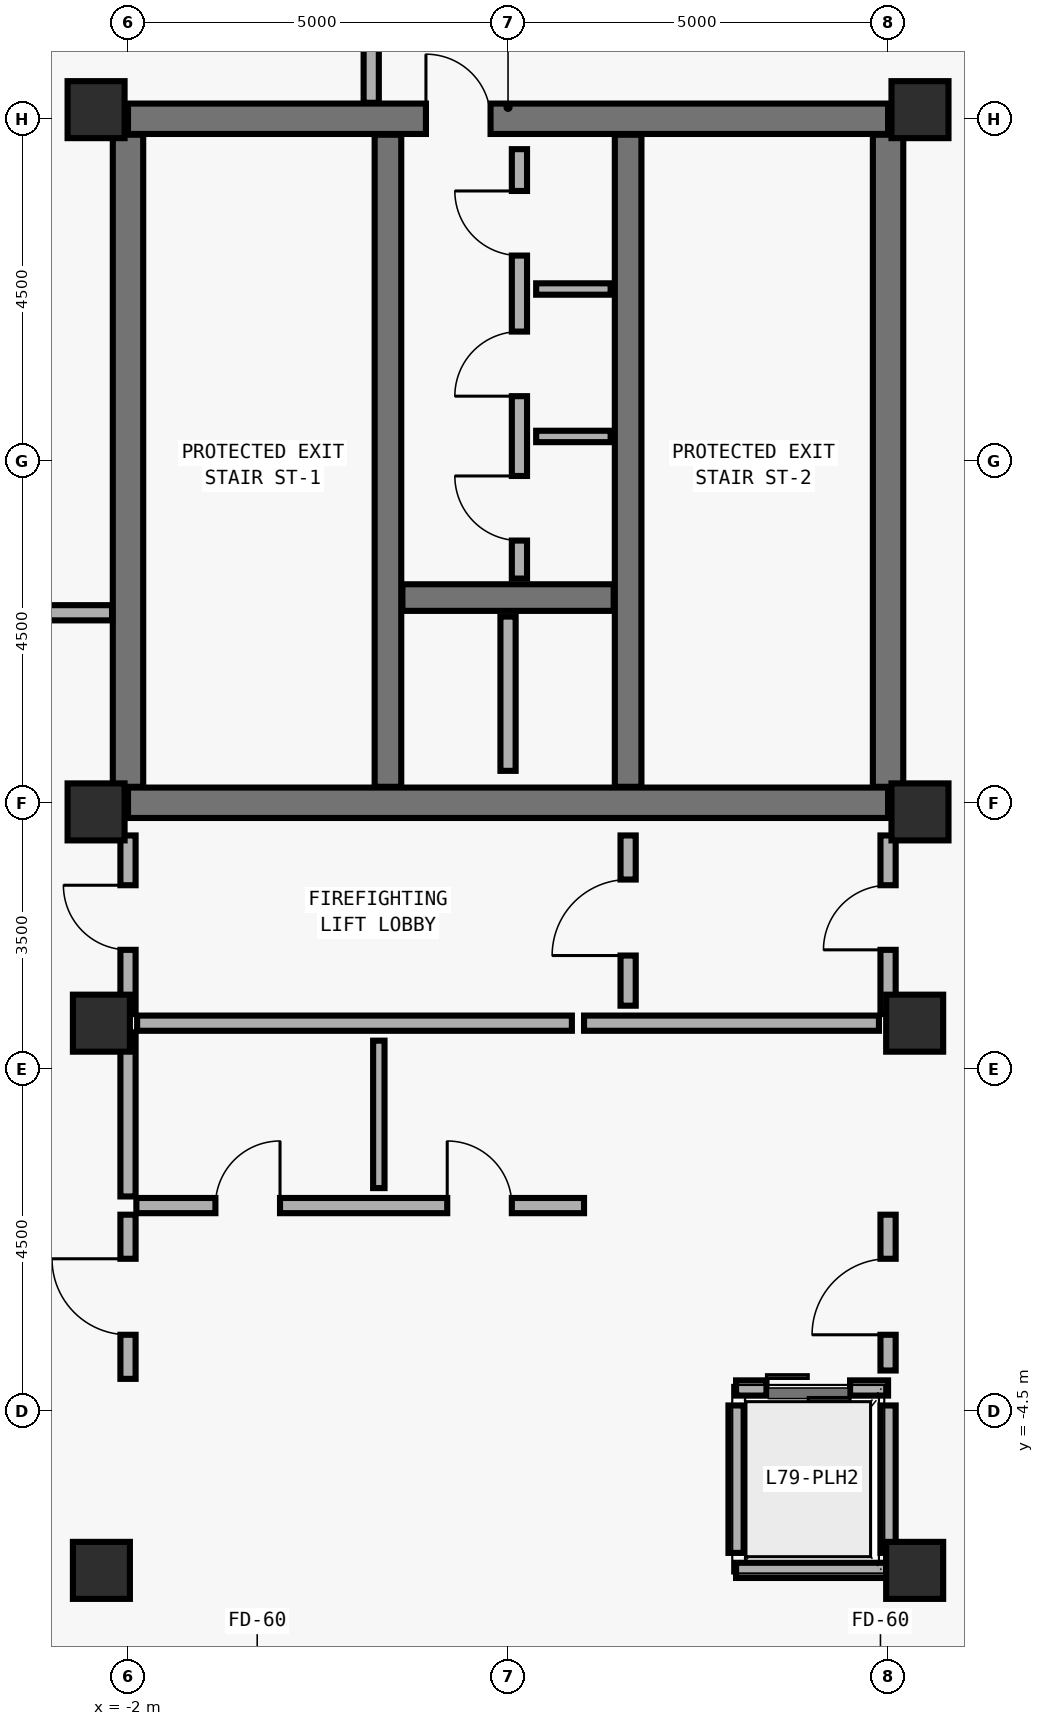
"""IFC4 building model, lengths in metres.
Left out: names, types, materials, properties, quantities, classifications, styles, units other than length and angle.
Written with IfcOpenShell. Run it as: python <this file> out.ifc"""

import sys

from ifc_helpers import new_model, si_unit, direction, frame, frame_2d, origin, origin_2d, place, context, subcontext, project, spatial, rectangle, extrude, element, fill, save


model = new_model("IFC4")
c1 = context("Model", 3, precision=1e-05, world=origin(), true_north=direction((0.0, 1.0)))
c2 = subcontext(c1, "Body", "Model", "MODEL_VIEW")
j1 = project(units=[si_unit("LENGTHUNIT", "METRE"), si_unit("PLANEANGLEUNIT", "RADIAN")], contexts=[c1])
p1 = place(None, origin())
s1 = spatial("IfcSite", under=j1, at=p1, CompositionType="ELEMENT")
p2 = place(p1, origin())
s2 = spatial("IfcBuilding", under=s1, at=p2, CompositionType="ELEMENT")
p3 = place(p2, frame((0.0, 0.0, 310.8)))
s3 = spatial("IfcBuildingStorey", under=s2, at=p3, CompositionType="ELEMENT", Elevation=310.8)
p4 = place(p3, frame((-2.0, 3.5, 0.0), z_axis=(0.0, 0.0, 1.0), x_axis=(1.0, 0.0, 0.0)))
e1 = element("IfcWall", 1, at=p4, inside=s3, PredefinedType="SHEAR", context=c2, shape_type="SweptSolid", body=[
    extrude(rectangle(XDim=10.0, YDim=0.4, at=frame_2d((5.0, 0.0))), origin(), (0.0, 0.0, 1.0), 4.192),
])
p5 = place(p3, frame((-2.0, 12.5, 0.0), z_axis=(0.0, 0.0, 1.0), x_axis=(1.0, 0.0, 0.0)))
e2 = element("IfcWall", 2, at=p5, inside=s3, PredefinedType="SHEAR", context=c2, shape_type="SweptSolid", body=[
    extrude(rectangle(XDim=10.0, YDim=0.4, at=frame_2d((5.0, 0.0))), origin(), (0.0, 0.0, 1.0), 4.192),
])
p6 = place(p5, frame((3.92, 0.0, 0.0)))
e3 = element("IfcOpeningElement", 3, at=p6, cuts=e2, PredefinedType="OPENING", context=c2, shape_type="SweptSolid", body=[
    extrude(rectangle(XDim=0.85, YDim=2.1, at=frame_2d((0.425, 1.05))), frame((0.0, 0.21, 0.0), z_axis=(0.0, -1.0, 0.0), x_axis=(1.0, 0.0, 0.0)), (0.0, 0.0, 1.0), 0.42),
])
for number, where, z_axis, x_axis in (
    (4, (-2.0, 3.71, 0.0), (0.0, 0.0, 1.0), (0.0, 1.0, 0.0)),
    (5, (8.0, 3.71, 0.0), (0.0, 0.0, 1.0), (0.0, 1.0, 0.0)),
):
    element("IfcWall", number, at=place(p3, frame(where, z_axis=z_axis, x_axis=x_axis)), inside=s3, PredefinedType="SHEAR", context=c2, shape_type="SweptSolid", body=[
        extrude(rectangle(XDim=8.58, YDim=0.4, at=frame_2d((4.29, 0.0))), origin(), (0.0, 0.0, 1.0), 4.192),
    ])
for number, where, z_axis, x_axis in (
    (6, (1.42, 3.71, 0.0), (0.0, 0.0, 1.0), (0.0, 1.0, 0.0)),
    (7, (4.58, 3.71, 0.0), (0.0, 0.0, 1.0), (0.0, 1.0, 0.0)),
):
    element("IfcWall", number, at=place(p3, frame(where, z_axis=z_axis, x_axis=x_axis)), inside=s3, PredefinedType="SHEAR", context=c2, shape_type="SweptSolid", body=[
        extrude(rectangle(XDim=8.58, YDim=0.35, at=frame_2d((4.29, 0.0))), origin(), (0.0, 0.0, 1.0), 4.192),
    ])
p7 = place(p3, frame((1.61, 6.2, 0.0), z_axis=(0.0, 0.0, 1.0), x_axis=(1.0, 0.0, 0.0)))
e8 = element("IfcWall", 8, at=p7, inside=s3, PredefinedType="SHEAR", context=c2, shape_type="SweptSolid", body=[
    extrude(rectangle(XDim=2.78, YDim=0.35, at=frame_2d((1.39, 0.0))), origin(), (0.0, 0.0, 1.0), 4.192),
])
for number, where, z_axis, x_axis in (
    (9, (-2.42, 12.62, 0.0), (0.0, 0.0, 1.0), (1.0, 0.0, 0.0)),
    (10, (8.42, 12.62, 0.0), (0.0, 0.0, 1.0), (1.0, 0.0, 0.0)),
    (11, (-2.42, 3.38, 0.0), (0.0, 0.0, 1.0), (1.0, 0.0, 0.0)),
    (12, (8.42, 3.38, 0.0), (0.0, 0.0, 1.0), (1.0, 0.0, 0.0)),
    (13, (-2.35, 0.6, 0.0), (0.0, 0.0, 1.0), (1.0, 0.0, 0.0)),
    (14, (8.35, 0.6, 0.0), (0.0, 0.0, 1.0), (1.0, 0.0, 0.0)),
    (15, (-2.35, -6.6, 0.0), (0.0, 0.0, 1.0), (1.0, 0.0, 0.0)),
    (16, (8.35, -6.6, 0.0), (0.0, 0.0, 1.0), (1.0, 0.0, 0.0)),
):
    element("IfcColumn", number, at=place(p3, frame(where, z_axis=z_axis, x_axis=x_axis)), inside=s3, PredefinedType="COLUMN", context=c2, shape_type="SweptSolid", body=[
        extrude(rectangle(XDim=0.75, YDim=0.75, at=origin_2d()), origin(), (0.0, 0.0, 1.0), 4.175),
    ])
p8 = place(p3, frame((3.0, 3.92, 0.0), z_axis=(0.0, 0.0, 1.0), x_axis=(0.0, 1.0, 0.0)))
e17 = element("IfcWall", 17, at=p8, inside=s3, PredefinedType="SOLIDWALL", context=c2, shape_type="SweptSolid", body=[
    extrude(rectangle(XDim=2.03, YDim=0.2, at=frame_2d((1.015, 0.0))), origin(), (0.0, 0.0, 1.0), 3.96),
])
p9 = place(p3, frame((4.0, 0.6, 0.0), z_axis=(0.0, 0.0, 1.0), x_axis=(1.0, 0.0, 0.0)))
e18 = element("IfcWall", 18, at=p9, inside=s3, PredefinedType="SOLIDWALL", context=c2, shape_type="SweptSolid", body=[
    extrude(rectangle(XDim=3.88, YDim=0.2, at=frame_2d((1.94, 0.0))), origin(), (0.0, 0.0, 1.0), 3.672),
])
p10 = place(p3, frame((6.0, -4.2, 0.0), z_axis=(0.0, 0.0, 1.0), x_axis=(1.0, 0.0, 0.0)))
e19 = element("IfcWall", 19, at=p10, inside=s3, PredefinedType="SOLIDWALL", context=c2, shape_type="SweptSolid", body=[
    extrude(rectangle(XDim=2.0, YDim=0.2, at=frame_2d((1.0, 0.0))), origin(), (0.0, 0.0, 1.0), 3.96),
])
p11 = place(p10, frame((0.4, 0.0, 0.0)))
e20 = element("IfcOpeningElement", 20, at=p11, cuts=e19, PredefinedType="OPENING", context=c2, shape_type="SweptSolid", body=[
    extrude(rectangle(XDim=1.1, YDim=2.2, at=frame_2d((0.55, 1.1))), frame((0.0, 0.11, 0.0), z_axis=(0.0, -1.0, 0.0), x_axis=(1.0, 0.0, 0.0)), (0.0, 0.0, 1.0), 0.22),
])
p12 = place(p3, frame((6.0, -6.6, 0.0), z_axis=(0.0, 0.0, 1.0), x_axis=(1.0, 0.0, 0.0)))
e21 = element("IfcWall", 21, at=p12, inside=s3, PredefinedType="SOLIDWALL", context=c2, shape_type="SweptSolid", body=[
    extrude(rectangle(XDim=2.0, YDim=0.2, at=frame_2d((1.0, 0.0))), origin(), (0.0, 0.0, 1.0), 3.672),
])
p13 = place(p3, frame((6.0, -6.37, 0.0), z_axis=(0.0, 0.0, 1.0), x_axis=(0.0, 1.0, 0.0)))
e22 = element("IfcWall", 22, at=p13, inside=s3, PredefinedType="SOLIDWALL", context=c2, shape_type="SweptSolid", body=[
    extrude(rectangle(XDim=1.94, YDim=0.2, at=frame_2d((0.97, 0.0))), origin(), (0.0, 0.0, 1.0), 3.96),
])
p14 = place(p3, frame((8.0, -6.37, 0.0), z_axis=(0.0, 0.0, 1.0), x_axis=(0.0, 1.0, 0.0)))
e23 = element("IfcWall", 23, at=p14, inside=s3, PredefinedType="SOLIDWALL", context=c2, shape_type="SweptSolid", body=[
    extrude(rectangle(XDim=1.94, YDim=0.2, at=frame_2d((0.97, 0.0))), origin(), (0.0, 0.0, 1.0), 3.672),
])
p15 = place(p3, frame((3.15, 6.45, 0.0), z_axis=(0.0, 0.0, 1.0), x_axis=(0.0, 1.0, 0.0)))
e24 = element("IfcWall", 24, at=p15, inside=s3, PredefinedType="MOVABLE", context=c2, shape_type="SweptSolid", body=[
    extrude(rectangle(XDim=5.65, YDim=0.2, at=frame_2d((2.825, 0.0))), origin(), (0.0, 0.0, 1.0), 3.96),
])
p16 = place(p15, frame((0.5, 0.0, 0.0)))
e25 = element("IfcOpeningElement", 25, at=p16, cuts=e24, PredefinedType="OPENING", context=c2, shape_type="SweptSolid", body=[
    extrude(rectangle(XDim=0.85, YDim=2.1, at=frame_2d((0.425, 1.05))), frame((0.0, 0.11, 0.0), z_axis=(0.0, -1.0, 0.0), x_axis=(1.0, 0.0, 0.0)), (0.0, 0.0, 1.0), 0.22),
])
p17 = place(p15, frame((2.4, 0.0, 0.0)))
e26 = element("IfcOpeningElement", 26, at=p17, cuts=e24, PredefinedType="OPENING", context=c2, shape_type="SweptSolid", body=[
    extrude(rectangle(XDim=0.85, YDim=2.1, at=frame_2d((0.425, 1.05))), frame((0.0, 0.11, 0.0), z_axis=(0.0, -1.0, 0.0), x_axis=(1.0, 0.0, 0.0)), (0.0, 0.0, 1.0), 0.22),
])
p18 = place(p15, frame((4.25, 0.0, 0.0)))
e27 = element("IfcOpeningElement", 27, at=p18, cuts=e24, PredefinedType="OPENING", context=c2, shape_type="SweptSolid", body=[
    extrude(rectangle(XDim=0.85, YDim=2.1, at=frame_2d((0.425, 1.05))), frame((0.0, 0.11, 0.0), z_axis=(0.0, -1.0, 0.0), x_axis=(1.0, 0.0, 0.0)), (0.0, 0.0, 1.0), 0.22),
])
p19 = place(p3, frame((4.58, 0.83, 0.0), z_axis=(0.0, 0.0, 1.0), x_axis=(0.0, 1.0, 0.0)))
e28 = element("IfcWall", 28, at=p19, inside=s3, PredefinedType="MOVABLE", context=c2, shape_type="SweptSolid", body=[
    extrude(rectangle(XDim=2.24, YDim=0.2, at=frame_2d((1.12, 0.0))), origin(), (0.0, 0.0, 1.0), 3.96),
])
p20 = place(p19, frame((0.66, 0.0, 0.0)))
e29 = element("IfcOpeningElement", 29, at=p20, cuts=e28, PredefinedType="OPENING", context=c2, shape_type="SweptSolid", body=[
    extrude(rectangle(XDim=1.0, YDim=2.1, at=frame_2d((0.5, 1.05))), frame((0.0, 0.11, 0.0), z_axis=(0.0, -1.0, 0.0), x_axis=(1.0, 0.0, 0.0)), (0.0, 0.0, 1.0), 0.22),
])
p21 = place(p3, frame((-2.0, 0.72, 0.0), z_axis=(0.0, 0.0, 1.0), x_axis=(0.0, 1.0, 0.0)))
e30 = element("IfcWall", 30, at=p21, inside=s3, PredefinedType="MOVABLE", context=c2, shape_type="SweptSolid", body=[
    extrude(rectangle(XDim=2.35, YDim=0.2, at=frame_2d((1.175, 0.0))), origin(), (0.0, 0.0, 1.0), 3.292),
])
p22 = place(p21, frame((0.845, 0.0, 0.0)))
e31 = element("IfcOpeningElement", 31, at=p22, cuts=e30, PredefinedType="OPENING", context=c2, shape_type="SweptSolid", body=[
    extrude(rectangle(XDim=0.85, YDim=2.1, at=frame_2d((0.425, 1.05))), frame((0.0, 0.11, 0.0), z_axis=(0.0, -1.0, 0.0), x_axis=(1.0, 0.0, 0.0)), (0.0, 0.0, 1.0), 0.22),
])
p23 = place(p3, frame((8.0, 0.72, 0.0), z_axis=(0.0, 0.0, 1.0), x_axis=(0.0, 1.0, 0.0)))
e32 = element("IfcWall", 32, at=p23, inside=s3, PredefinedType="MOVABLE", context=c2, shape_type="SweptSolid", body=[
    extrude(rectangle(XDim=2.35, YDim=0.2, at=frame_2d((1.175, 0.0))), origin(), (0.0, 0.0, 1.0), 3.292),
])
p24 = place(p23, frame((0.845, 0.0, 0.0)))
e33 = element("IfcOpeningElement", 33, at=p24, cuts=e32, PredefinedType="OPENING", context=c2, shape_type="SweptSolid", body=[
    extrude(rectangle(XDim=0.85, YDim=2.1, at=frame_2d((0.425, 1.05))), frame((0.0, 0.11, 0.0), z_axis=(0.0, -1.0, 0.0), x_axis=(1.0, 0.0, 0.0)), (0.0, 0.0, 1.0), 0.22),
])
p25 = place(p3, frame((-2.0, -4.08, 0.0), z_axis=(0.0, 0.0, 1.0), x_axis=(0.0, 1.0, 0.0)))
e34 = element("IfcWall", 34, at=p25, inside=s3, PredefinedType="MOVABLE", context=c2, shape_type="SweptSolid", body=[
    extrude(rectangle(XDim=2.16, YDim=0.2, at=frame_2d((1.08, 0.0))), origin(), (0.0, 0.0, 1.0), 3.672),
])
p26 = place(p25, frame((0.58, 0.0, 0.0)))
e35 = element("IfcOpeningElement", 35, at=p26, cuts=e34, PredefinedType="OPENING", context=c2, shape_type="SweptSolid", body=[
    extrude(rectangle(XDim=1.0, YDim=2.1, at=frame_2d((0.5, 1.05))), frame((0.0, 0.11, 0.0), z_axis=(0.0, -1.0, 0.0), x_axis=(1.0, 0.0, 0.0)), (0.0, 0.0, 1.0), 0.22),
])
p27 = place(p3, frame((8.0, -3.97, 0.0), z_axis=(0.0, 0.0, 1.0), x_axis=(0.0, 1.0, 0.0)))
e36 = element("IfcWall", 36, at=p27, inside=s3, PredefinedType="MOVABLE", context=c2, shape_type="SweptSolid", body=[
    extrude(rectangle(XDim=2.05, YDim=0.2, at=frame_2d((1.025, 0.0))), origin(), (0.0, 0.0, 1.0), 3.672),
])
p28 = place(p27, frame((0.47, 0.0, 0.0)))
e37 = element("IfcOpeningElement", 37, at=p28, cuts=e36, PredefinedType="OPENING", context=c2, shape_type="SweptSolid", body=[
    extrude(rectangle(XDim=1.0, YDim=2.1, at=frame_2d((0.5, 1.05))), frame((0.0, 0.11, 0.0), z_axis=(0.0, -1.0, 0.0), x_axis=(1.0, 0.0, 0.0)), (0.0, 0.0, 1.0), 0.22),
])
p29 = place(p3, frame((-1.89, -1.8, 0.0), z_axis=(0.0, 0.0, 1.0), x_axis=(1.0, 0.0, 0.0)))
e38 = element("IfcWall", 38, at=p29, inside=s3, PredefinedType="MOVABLE", context=c2, shape_type="SweptSolid", body=[
    extrude(rectangle(XDim=5.89, YDim=0.2, at=frame_2d((2.945, 0.0))), origin(), (0.0, 0.0, 1.0), 3.96),
])
p30 = place(p29, frame((1.04, 0.0, 0.0)))
e39 = element("IfcOpeningElement", 39, at=p30, cuts=e38, PredefinedType="OPENING", context=c2, shape_type="SweptSolid", body=[
    extrude(rectangle(XDim=0.85, YDim=2.1, at=frame_2d((0.425, 1.05))), frame((0.0, 0.11, 0.0), z_axis=(0.0, -1.0, 0.0), x_axis=(1.0, 0.0, 0.0)), (0.0, 0.0, 1.0), 0.22),
])
p31 = place(p29, frame((4.09, 0.0, 0.0)))
e40 = element("IfcOpeningElement", 40, at=p31, cuts=e38, PredefinedType="OPENING", context=c2, shape_type="SweptSolid", body=[
    extrude(rectangle(XDim=0.85, YDim=2.1, at=frame_2d((0.425, 1.05))), frame((0.0, 0.11, 0.0), z_axis=(0.0, -1.0, 0.0), x_axis=(1.0, 0.0, 0.0)), (0.0, 0.0, 1.0), 0.22),
])
for number, where, z_axis, x_axis in (
    (41, (3.37, 8.32, 0.0), (0.0, 0.0, 1.0), (1.0, 0.0, 0.0)),
    (42, (3.37, 10.26, 0.0), (0.0, 0.0, 1.0), (1.0, 0.0, 0.0)),
):
    element("IfcWall", number, at=place(p3, frame(where, z_axis=z_axis, x_axis=x_axis)), inside=s3, PredefinedType="PARTITIONING", context=c2, shape_type="SweptSolid", body=[
        extrude(rectangle(XDim=0.98, YDim=0.15, at=frame_2d((0.49, 0.0))), origin(), (0.0, 0.0, 1.0), 3.96),
    ])
p32 = place(p3, frame((-1.88, 0.6, 0.0), z_axis=(0.0, 0.0, 1.0), x_axis=(1.0, 0.0, 0.0)))
e43 = element("IfcWall", 43, at=p32, inside=s3, PredefinedType="MOVABLE", context=c2, shape_type="SweptSolid", body=[
    extrude(rectangle(XDim=5.72, YDim=0.2, at=frame_2d((2.86, 0.0))), origin(), (0.0, 0.0, 1.0), 3.672),
])
p33 = place(p3, frame((1.3, -1.57, 0.0), z_axis=(0.0, 0.0, 1.0), x_axis=(0.0, 1.0, 0.0)))
e44 = element("IfcWall", 44, at=p33, inside=s3, PredefinedType="PARTITIONING", context=c2, shape_type="SweptSolid", body=[
    extrude(rectangle(XDim=1.94, YDim=0.15, at=frame_2d((0.97, 0.0))), origin(), (0.0, 0.0, 1.0), 3.96),
])
p34 = place(p3, frame((-2.0, -1.68, 0.0), z_axis=(0.0, 0.0, 1.0), x_axis=(0.0, 1.0, 0.0)))
e45 = element("IfcWall", 45, at=p34, inside=s3, PredefinedType="MOVABLE", context=c2, shape_type="SweptSolid", body=[
    extrude(rectangle(XDim=2.16, YDim=0.2, at=frame_2d((1.08, 0.0))), origin(), (0.0, 0.0, 1.0), 3.672),
])
p35 = place(p3, frame((-2.21, 6.0, 0.0), z_axis=(0.0, 0.0, 1.0), x_axis=(-1.0, 0.0, 0.0)))
e46 = element("IfcWall", 46, at=p35, inside=s3, PredefinedType="MOVABLE", context=c2, shape_type="SweptSolid", body=[
    extrude(rectangle(XDim=2.28, YDim=0.2, at=frame_2d((1.14, 0.0))), origin(), (0.0, 0.0, 1.0), 3.96),
])
p36 = place(p3, frame((1.2, 14.49, 0.0), z_axis=(0.0, 0.0, 1.0), x_axis=(0.0, -1.0, 0.0)))
e47 = element("IfcWall", 47, at=p36, inside=s3, PredefinedType="MOVABLE", context=c2, shape_type="SweptSolid", body=[
    extrude(rectangle(XDim=1.78, YDim=0.2, at=frame_2d((0.89, 0.0))), origin(), (0.0, 0.0, 1.0), 3.96),
])
p37 = place(p6, origin())
e48 = element("IfcDoor", 48, at=p37, inside=s3, OperationType="SINGLE_SWING_LEFT", PredefinedType="DOOR", context=c2, shape_type="SweptSolid", body=[
    extrude(rectangle(XDim=0.85, YDim=2.1, at=frame_2d((0.425, 1.05))), frame((0.0, 0.025, 0.0), z_axis=(0.0, -1.0, 0.0), x_axis=(1.0, 0.0, 0.0)), (0.0, 0.0, 1.0), 0.05),
])
fill(e3, e48)
p38 = place(p16, origin())
e49 = element("IfcDoor", 49, at=p38, inside=s3, OperationType="SINGLE_SWING_RIGHT", PredefinedType="DOOR", context=c2, shape_type="SweptSolid", body=[
    extrude(rectangle(XDim=0.85, YDim=2.1, at=frame_2d((0.425, 1.05))), frame((0.0, 0.025, 0.0), z_axis=(0.0, -1.0, 0.0), x_axis=(1.0, 0.0, 0.0)), (0.0, 0.0, 1.0), 0.05),
])
fill(e25, e49)
p39 = place(p17, origin())
e50 = element("IfcDoor", 50, at=p39, inside=s3, OperationType="SINGLE_SWING_LEFT", PredefinedType="DOOR", context=c2, shape_type="SweptSolid", body=[
    extrude(rectangle(XDim=0.85, YDim=2.1, at=frame_2d((0.425, 1.05))), frame((0.0, 0.025, 0.0), z_axis=(0.0, -1.0, 0.0), x_axis=(1.0, 0.0, 0.0)), (0.0, 0.0, 1.0), 0.05),
])
fill(e26, e50)
p40 = place(p18, origin())
e51 = element("IfcDoor", 51, at=p40, inside=s3, OperationType="SINGLE_SWING_RIGHT", PredefinedType="DOOR", context=c2, shape_type="SweptSolid", body=[
    extrude(rectangle(XDim=0.85, YDim=2.1, at=frame_2d((0.425, 1.05))), frame((0.0, 0.025, 0.0), z_axis=(0.0, -1.0, 0.0), x_axis=(1.0, 0.0, 0.0)), (0.0, 0.0, 1.0), 0.05),
])
fill(e27, e51)
p41 = place(p20, origin())
e52 = element("IfcDoor", 52, at=p41, inside=s3, OperationType="SINGLE_SWING_LEFT", PredefinedType="DOOR", context=c2, shape_type="SweptSolid", body=[
    extrude(rectangle(XDim=1.0, YDim=2.1, at=frame_2d((0.5, 1.05))), frame((0.0, 0.025, 0.0), z_axis=(0.0, -1.0, 0.0), x_axis=(1.0, 0.0, 0.0)), (0.0, 0.0, 1.0), 0.05),
])
fill(e29, e52)
p42 = place(p22, origin())
e53 = element("IfcDoor", 53, at=p42, inside=s3, OperationType="SINGLE_SWING_RIGHT", PredefinedType="DOOR", context=c2, shape_type="SweptSolid", body=[
    extrude(rectangle(XDim=0.85, YDim=2.1, at=frame_2d((0.425, 1.05))), frame((0.0, 0.025, 0.0), z_axis=(0.0, -1.0, 0.0), x_axis=(1.0, 0.0, 0.0)), (0.0, 0.0, 1.0), 0.05),
])
fill(e31, e53)
p43 = place(p24, origin())
e54 = element("IfcDoor", 54, at=p43, inside=s3, OperationType="SINGLE_SWING_LEFT", PredefinedType="DOOR", context=c2, shape_type="SweptSolid", body=[
    extrude(rectangle(XDim=0.85, YDim=2.1, at=frame_2d((0.425, 1.05))), frame((0.0, 0.025, 0.0), z_axis=(0.0, -1.0, 0.0), x_axis=(1.0, 0.0, 0.0)), (0.0, 0.0, 1.0), 0.05),
])
fill(e33, e54)
p44 = place(p26, origin())
e55 = element("IfcDoor", 55, at=p44, inside=s3, OperationType="SINGLE_SWING_RIGHT", PredefinedType="DOOR", context=c2, shape_type="SweptSolid", body=[
    extrude(rectangle(XDim=1.0, YDim=2.1, at=frame_2d((0.5, 1.05))), frame((0.0, 0.025, 0.0), z_axis=(0.0, -1.0, 0.0), x_axis=(1.0, 0.0, 0.0)), (0.0, 0.0, 1.0), 0.05),
])
fill(e35, e55)
p45 = place(p28, origin())
e56 = element("IfcDoor", 56, at=p45, inside=s3, OperationType="SINGLE_SWING_LEFT", PredefinedType="DOOR", context=c2, shape_type="SweptSolid", body=[
    extrude(rectangle(XDim=1.0, YDim=2.1, at=frame_2d((0.5, 1.05))), frame((0.0, 0.025, 0.0), z_axis=(0.0, -1.0, 0.0), x_axis=(1.0, 0.0, 0.0)), (0.0, 0.0, 1.0), 0.05),
])
fill(e37, e56)
p46 = place(p30, origin())
e57 = element("IfcDoor", 57, at=p46, inside=s3, OperationType="SINGLE_SWING_RIGHT", PredefinedType="DOOR", context=c2, shape_type="SweptSolid", body=[
    extrude(rectangle(XDim=0.85, YDim=2.1, at=frame_2d((0.425, 1.05))), frame((0.0, 0.025, 0.0), z_axis=(0.0, -1.0, 0.0), x_axis=(1.0, 0.0, 0.0)), (0.0, 0.0, 1.0), 0.05),
])
fill(e39, e57)
p47 = place(p31, origin())
e58 = element("IfcDoor", 58, at=p47, inside=s3, OperationType="SINGLE_SWING_LEFT", PredefinedType="DOOR", context=c2, shape_type="SweptSolid", body=[
    extrude(rectangle(XDim=0.85, YDim=2.1, at=frame_2d((0.425, 1.05))), frame((0.0, 0.025, 0.0), z_axis=(0.0, -1.0, 0.0), x_axis=(1.0, 0.0, 0.0)), (0.0, 0.0, 1.0), 0.05),
])
fill(e40, e58)
p48 = place(p11, origin())
e59 = element("IfcDoor", 59, at=p48, inside=s3, OperationType="DOUBLE_DOOR_SLIDING", PredefinedType="DOOR", context=c2, shape_type="SweptSolid", body=[
    extrude(rectangle(XDim=1.1, YDim=2.2, at=frame_2d((0.55, 1.1))), frame((0.0, 0.025, 0.0), z_axis=(0.0, -1.0, 0.0), x_axis=(1.0, 0.0, 0.0)), (0.0, 0.0, 1.0), 0.05),
])
fill(e20, e59)
save(model, sys.argv[1])
